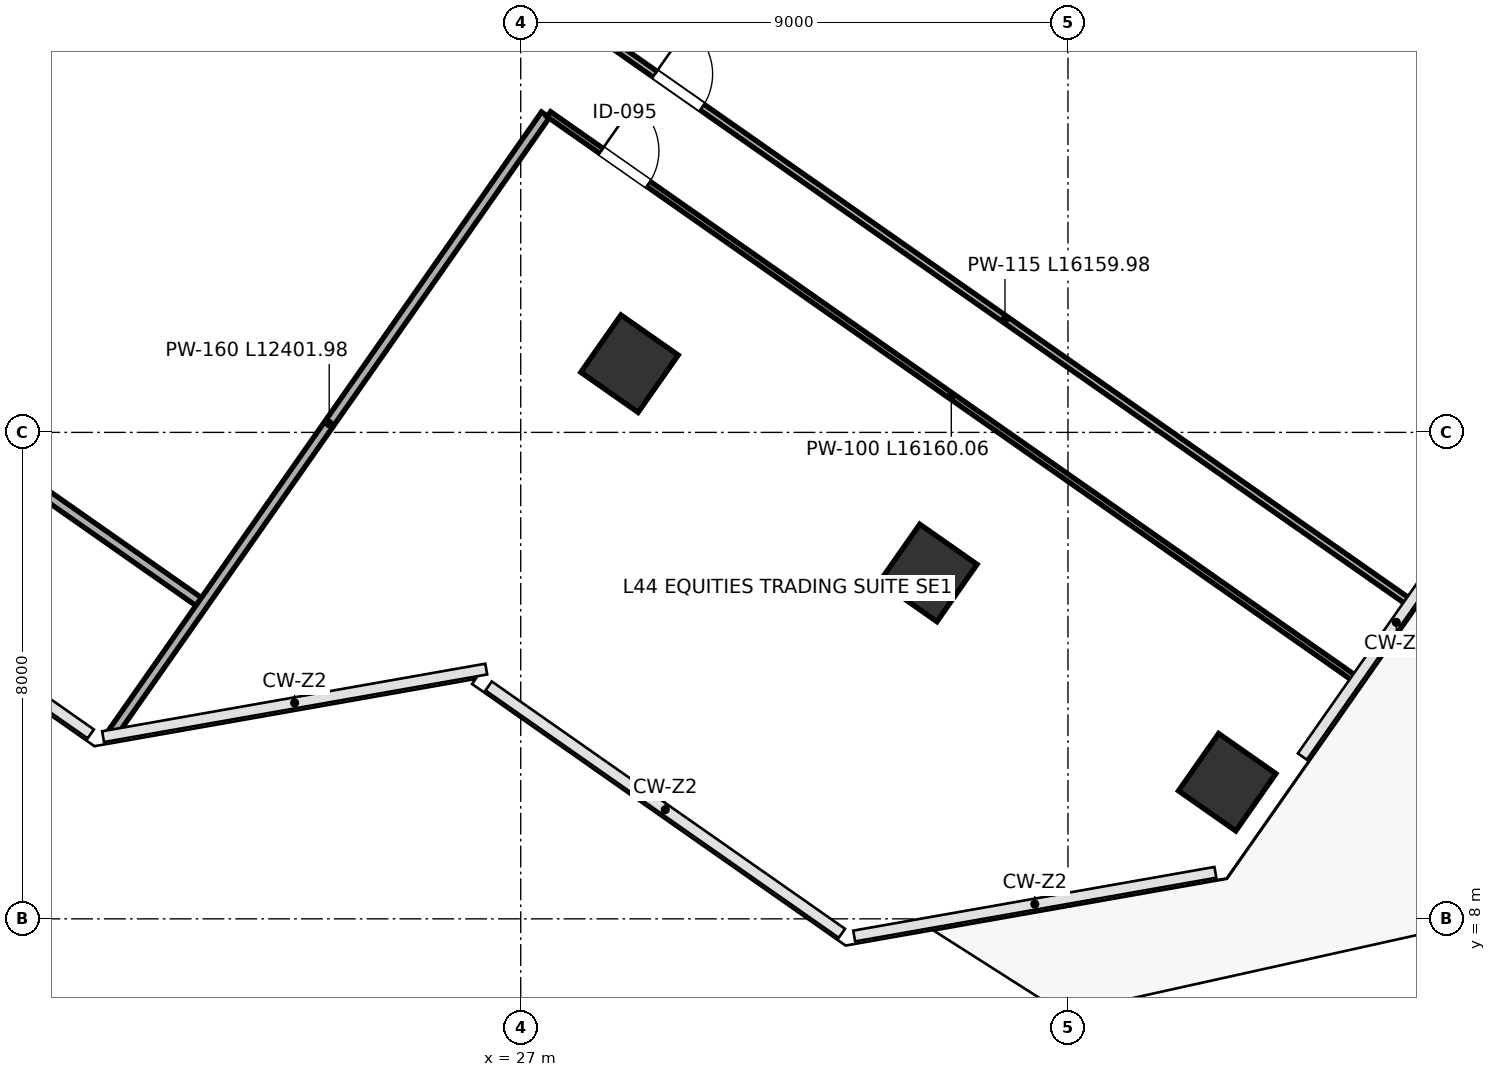
"""IFC4 building model, lengths in metres.
Left out: names, types, materials, properties, quantities, classifications, styles, units other than length and angle.
Written with IfcOpenShell. Run it as: python <this file> out.ifc"""

import sys

from ifc_helpers import new_model, si_unit, direction, frame, frame_2d, origin, origin_2d, place, context, subcontext, project, spatial, rectangle, extrude, clip, halfspace, source, transform, mapped, element, fill, save


model = new_model("IFC4")
c1 = context("Model", 3, precision=1e-05, world=origin(), true_north=direction((0.0, 1.0)))
c2 = subcontext(c1, "Body", "Model", "MODEL_VIEW")
j1 = project(units=[si_unit("LENGTHUNIT", "METRE"), si_unit("PLANEANGLEUNIT", "RADIAN")], contexts=[c1])
p1 = place(None, origin())
s1 = spatial("IfcSite", under=j1, at=p1, CompositionType="ELEMENT")
p2 = place(p1, origin())
s2 = spatial("IfcBuilding", under=s1, at=p2, CompositionType="ELEMENT")
p3 = place(p2, frame((0.0, 0.0, 196.0)))
s3 = spatial("IfcBuildingStorey", under=s2, at=p3, CompositionType="ELEMENT", Elevation=196.0)
p4 = place(p3, frame((28.789, 17.13, 0.0), z_axis=(-0.077375189138, -0.036834296625, 0.996321391268), x_axis=(0.163888057294, 0.985253625304, 0.049152807664)))
e1 = element("IfcColumn", 1, at=p4, inside=s3, PredefinedType="COLUMN", context=c2, shape_type="Clipping", body=[
    clip(clip(extrude(rectangle(XDim=1.15, YDim=1.15, at=origin_2d()), origin(), (0.0, 0.0, 1.0), 4.216), halfspace(frame((0.0, 0.0, 0.07), z_axis=(0.0, 0.0, -1.0), x_axis=(1.0, 0.0, 0.0)), False)), halfspace(frame((0.0, 0.0, 4.146), z_axis=(0.0, 0.0, 1.0), x_axis=(1.0, 0.0, 0.0)), False)),
])
p5 = place(p3, frame((33.704, 13.688, 0.0), z_axis=(-0.095234628141, -0.061968924194, 0.993524140641), x_axis=(0.03088004258, 0.997396227548, 0.065170455291)))
e2 = element("IfcColumn", 2, at=p5, inside=s3, PredefinedType="COLUMN", context=c2, shape_type="Clipping", body=[
    clip(clip(extrude(rectangle(XDim=1.15, YDim=1.15, at=origin_2d()), origin(), (0.0, 0.0, 1.0), 4.227), halfspace(frame((0.0, 0.0, 0.092), z_axis=(0.0, 0.0, -1.0), x_axis=(1.0, 0.0, 0.0)), False)), halfspace(frame((0.0, 0.0, 4.135), z_axis=(0.0, 0.0, 1.0), x_axis=(1.0, 0.0, 0.0)), False)),
])
p6 = place(p3, frame((38.619, 10.247, 0.0), z_axis=(-0.112773771194, -0.086824296292, 0.989819992779), x_axis=(-0.049860626001, 0.995414372182, 0.081634218489)))
e3 = element("IfcColumn", 3, at=p6, inside=s3, PredefinedType="COLUMN", context=c2, shape_type="Clipping", body=[
    clip(clip(extrude(rectangle(XDim=1.15, YDim=1.15, at=origin_2d()), origin(), (0.0, 0.0, 1.0), 4.243), halfspace(frame((0.0, 0.0, 0.116), z_axis=(0.0, 0.0, -1.0), x_axis=(1.0, 0.0, 0.0)), False)), halfspace(frame((0.0, 0.0, 4.127), z_axis=(0.0, 0.0, 1.0), x_axis=(1.0, 0.0, 0.0)), False)),
])
p7 = place(p3, frame((7.614, 23.082, 0.0), z_axis=(0.0, 0.0, 1.0), x_axis=(0.819144092075, -0.573587793123, 0.0)))
e4 = element("IfcWall", 4, at=p7, inside=s3, PredefinedType="PARTITIONING", context=c2, shape_type="SweptSolid", body=[
    extrude(rectangle(XDim=17.24, YDim=0.16, at=frame_2d((8.62, 0.0))), origin(), (0.0, 0.0, 1.0), 3.96),
])
p8 = place(p3, frame((20.293, 11.064, 0.0), z_axis=(0.0, 0.0, 1.0), x_axis=(0.573585209026, 0.819145901526, 0.0)))
e5 = element("IfcWall", 5, at=p8, inside=s3, PredefinedType="PARTITIONING", context=c2, shape_type="SweptSolid", body=[
    extrude(rectangle(XDim=12.402, YDim=0.16, at=frame_2d((6.201, 0.0))), origin(), (0.0, 0.0, 1.0), 3.96),
])
p9 = place(p3, frame((28.346, 22.494, 0.0), z_axis=(0.0, 0.0, 1.0), x_axis=(0.819146739804, -0.573584011866, 0.0)))
e6 = element("IfcWall", 6, at=p9, inside=s3, PredefinedType="PARTITIONING", context=c2, shape_type="SweptSolid", body=[
    extrude(rectangle(XDim=16.16, YDim=0.115, at=frame_2d((8.08, 0.0))), origin(), (0.0, 0.0, 1.0), 3.96),
])
p10 = place(p9, frame((1.05, 0.0, 0.0)))
e7 = element("IfcOpeningElement", 7, at=p10, cuts=e6, PredefinedType="OPENING", context=c2, shape_type="SweptSolid", body=[
    extrude(rectangle(XDim=0.95, YDim=2.15, at=frame_2d((0.475, 1.075))), frame((0.0, 0.067, 0.0), z_axis=(0.0, -1.0, 0.0), x_axis=(1.0, 0.0, 0.0)), (0.0, 0.0, 1.0), 0.135),
])
p11 = place(p3, frame((27.462, 21.233, 0.0), z_axis=(0.0, 0.0, 1.0), x_axis=(0.819151710168, -0.573576913525, 0.0)))
e8 = element("IfcWall", 8, at=p11, inside=s3, PredefinedType="PARTITIONING", context=c2, shape_type="SweptSolid", body=[
    extrude(rectangle(XDim=16.16, YDim=0.1, at=frame_2d((8.08, 0.0))), origin(), (0.0, 0.0, 1.0), 3.96),
])
p12 = place(p11, frame((1.05, 0.0, 0.0)))
e9 = element("IfcOpeningElement", 9, at=p12, cuts=e8, PredefinedType="OPENING", context=c2, shape_type="SweptSolid", body=[
    extrude(rectangle(XDim=0.95, YDim=2.15, at=frame_2d((0.475, 1.075))), frame((0.0, 0.06, 0.0), z_axis=(0.0, -1.0, 0.0), x_axis=(1.0, 0.0, 0.0)), (0.0, 0.0, 1.0), 0.12),
])
m1 = source(origin(), c2, "Body", "SweptSolid", [
    extrude(rectangle(XDim=0.95, YDim=2.15, at=frame_2d((0.475, 1.075))), frame((0.0, 0.025, 0.0), z_axis=(0.0, -1.0, 0.0), x_axis=(1.0, 0.0, 0.0)), (0.0, 0.0, 1.0), 0.05),
])
p13 = place(p10, origin())
e10 = element("IfcDoor", 10, at=p13, inside=s3, OperationType="SINGLE_SWING_LEFT", PredefinedType="DOOR", context=c2, shape_type="MappedRepresentation", body=[
    mapped(m1, transform((0.0, 0.0, 0.0), scale=1.0)),
])
fill(e7, e10)
p14 = place(p12, origin())
e11 = element("IfcDoor", 11, at=p14, inside=s3, OperationType="SINGLE_SWING_LEFT", PredefinedType="DOOR", context=c2, shape_type="MappedRepresentation", body=[
    mapped(m1, transform((0.0, 0.0, 0.0), scale=1.0)),
])
fill(e9, e11)
save(model, sys.argv[1])
